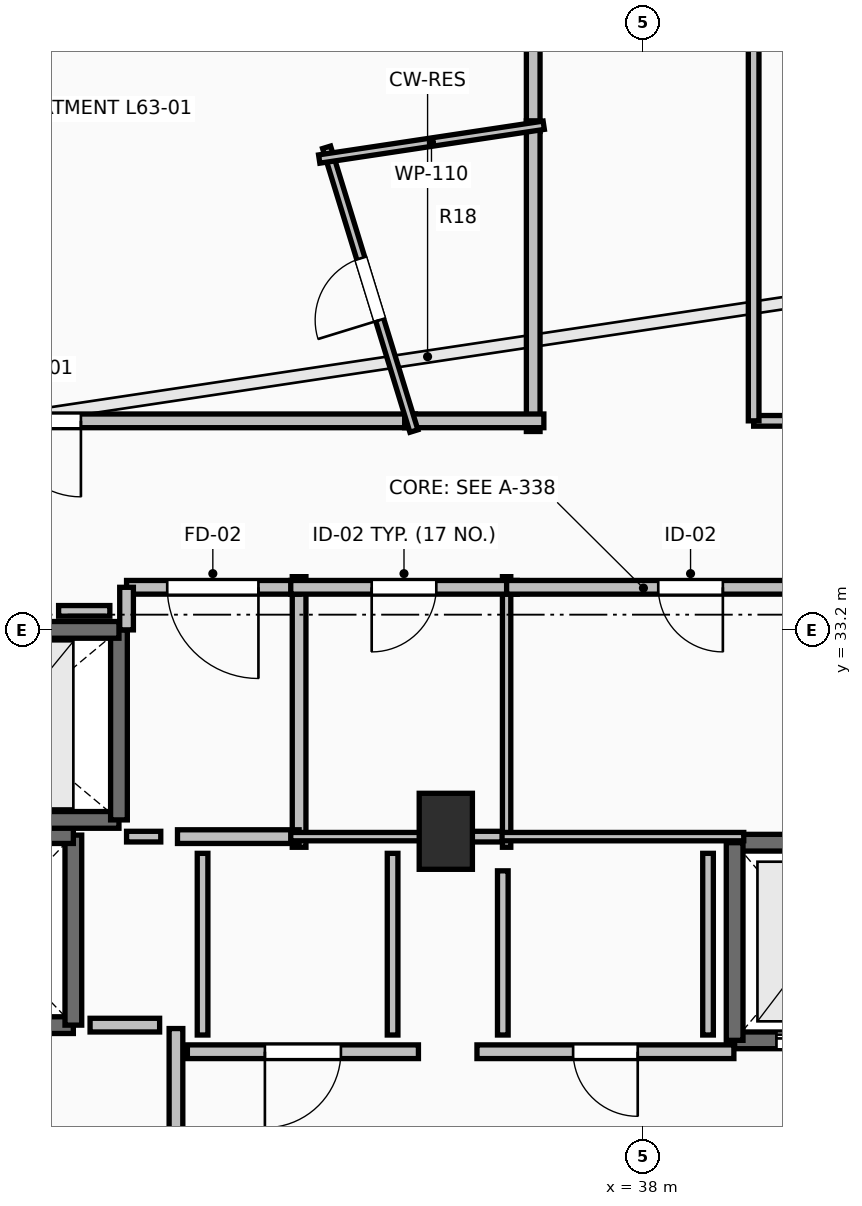
"""IFC4 building model, lengths in metres.
Left out: names, types, materials, properties, quantities, classifications, styles, units other than length and angle.
Written with IfcOpenShell. Run it as: python <this file> out.ifc"""

import sys

from ifc_helpers import new_model, si_unit, direction, frame, frame_2d, origin, origin_2d, place, context, subcontext, project, spatial, rectangle, extrude, element, fill, save


model = new_model("IFC4")
c1 = context("Model", 3, precision=1e-05, world=origin(), true_north=direction((0.0, 1.0)))
c2 = subcontext(c1, "Body", "Model", "MODEL_VIEW")
j1 = project(units=[si_unit("LENGTHUNIT", "METRE"), si_unit("PLANEANGLEUNIT", "RADIAN")], contexts=[c1])
p1 = place(None, origin())
s1 = spatial("IfcSite", under=j1, at=p1, CompositionType="ELEMENT")
p2 = place(p1, origin())
s2 = spatial("IfcBuilding", under=s1, at=p2, CompositionType="ELEMENT")
p3 = place(p2, frame((0.0, 0.0, 234.25)))
s3 = spatial("IfcBuildingStorey", under=s2, at=p3, CompositionType="ELEMENT", Elevation=234.25)
p4 = place(p3, frame((35.4, 30.55, 0.0), z_axis=(0.0, 0.0, 1.0), x_axis=(1.0, 0.0, 0.0)))
e1 = element("IfcColumn", 1, at=p4, inside=s3, PredefinedType="PILASTER", context=c2, shape_type="SweptSolid", body=[
    extrude(rectangle(XDim=0.7, YDim=1.0, at=origin_2d()), origin(), (0.0, 0.0, 1.0), 3.55),
])
p5 = place(p3, frame((39.2, 27.8, 0.0), z_axis=(0.0, 0.0, 1.0), x_axis=(1.0, 0.0, 0.0)))
e2 = element("IfcWall", 2, at=p5, inside=s3, PredefinedType="SOLIDWALL", context=c2, shape_type="SweptSolid", body=[
    extrude(rectangle(XDim=2.2, YDim=0.22, at=frame_2d((1.1, 0.0))), origin(), (0.0, 0.0, 1.0), 3.29),
])
p6 = place(p5, frame((0.55, 0.0, 0.0)))
e3 = element("IfcOpeningElement", 3, at=p6, cuts=e2, PredefinedType="OPENING", context=c2, shape_type="SweptSolid", body=[
    extrude(rectangle(XDim=1.1, YDim=2.2, at=frame_2d((0.55, 1.1))), frame((0.0, 0.125, 0.0), z_axis=(0.0, -1.0, 0.0), x_axis=(1.0, 0.0, 0.0)), (0.0, 0.0, 1.0), 0.25),
])
p7 = place(p3, frame((41.4, 30.4, 0.0), z_axis=(0.0, 0.0, 1.0), x_axis=(-1.0, 0.0, 0.0)))
e4 = element("IfcWall", 4, at=p7, inside=s3, PredefinedType="SOLIDWALL", context=c2, shape_type="SweptSolid", body=[
    extrude(rectangle(XDim=2.2, YDim=0.22, at=frame_2d((1.1, 0.0))), origin(), (0.0, 0.0, 1.0), 3.29),
])
p8 = place(p3, frame((39.2, 30.4, 0.0), z_axis=(0.0, 0.0, 1.0), x_axis=(0.0, -1.0, 0.0)))
e5 = element("IfcWall", 5, at=p8, inside=s3, PredefinedType="SOLIDWALL", context=c2, shape_type="SweptSolid", body=[
    extrude(rectangle(XDim=2.6, YDim=0.22, at=frame_2d((1.3, 0.0))), origin(), (0.0, 0.0, 1.0), 3.29),
])
p9 = place(p3, frame((28.1, 28.0, 0.0), z_axis=(0.0, 0.0, 1.0), x_axis=(1.0, 0.0, 0.0)))
e6 = element("IfcWall", 6, at=p9, inside=s3, PredefinedType="SHEAR", context=c2, shape_type="SweptSolid", body=[
    extrude(rectangle(XDim=2.4, YDim=0.22, at=frame_2d((1.2, 0.0))), origin(), (0.0, 0.0, 1.0), 3.29),
])
p10 = place(p9, frame((0.6, 0.0, 0.0)))
e7 = element("IfcOpeningElement", 7, at=p10, cuts=e6, PredefinedType="OPENING", context=c2, shape_type="SweptSolid", body=[
    extrude(rectangle(XDim=1.2, YDim=2.2, at=frame_2d((0.6, 1.1))), frame((0.0, 0.125, 0.0), z_axis=(0.0, -1.0, 0.0), x_axis=(1.0, 0.0, 0.0)), (0.0, 0.0, 1.0), 0.25),
])
p11 = place(p3, frame((30.5, 28.0, 0.0), z_axis=(0.0, 0.0, 1.0), x_axis=(0.0, 1.0, 0.0)))
e8 = element("IfcWall", 8, at=p11, inside=s3, PredefinedType="SHEAR", context=c2, shape_type="SweptSolid", body=[
    extrude(rectangle(XDim=2.5, YDim=0.22, at=frame_2d((1.25, 0.0))), origin(), (0.0, 0.0, 1.0), 3.29),
])
p12 = place(p3, frame((30.5, 30.5, 0.0), z_axis=(0.0, 0.0, 1.0), x_axis=(-1.0, 0.0, 0.0)))
e9 = element("IfcWall", 9, at=p12, inside=s3, PredefinedType="SHEAR", context=c2, shape_type="SweptSolid", body=[
    extrude(rectangle(XDim=2.4, YDim=0.22, at=frame_2d((1.2, 0.0))), origin(), (0.0, 0.0, 1.0), 3.29),
])
p13 = place(p3, frame((28.1, 30.7, 0.0), z_axis=(0.0, 0.0, 1.0), x_axis=(1.0, 0.0, 0.0)))
e10 = element("IfcWall", 10, at=p13, inside=s3, PredefinedType="SOLIDWALL", context=c2, shape_type="SweptSolid", body=[
    extrude(rectangle(XDim=3.0, YDim=0.22, at=frame_2d((1.5, 0.0))), origin(), (0.0, 0.0, 1.0), 3.29),
])
p14 = place(p3, frame((31.1, 30.7, 0.0), z_axis=(0.0, 0.0, 1.0), x_axis=(0.0, 1.0, 0.0)))
e11 = element("IfcWall", 11, at=p14, inside=s3, PredefinedType="SOLIDWALL", context=c2, shape_type="SweptSolid", body=[
    extrude(rectangle(XDim=2.5, YDim=0.22, at=frame_2d((1.25, 0.0))), origin(), (0.0, 0.0, 1.0), 3.29),
])
p15 = place(p3, frame((31.1, 33.2, 0.0), z_axis=(0.0, 0.0, 1.0), x_axis=(-1.0, 0.0, 0.0)))
e12 = element("IfcWall", 12, at=p15, inside=s3, PredefinedType="SOLIDWALL", context=c2, shape_type="SweptSolid", body=[
    extrude(rectangle(XDim=3.0, YDim=0.22, at=frame_2d((1.5, 0.0))), origin(), (0.0, 0.0, 1.0), 3.29),
])
p16 = place(p15, frame((0.9, 0.0, 0.0)))
e13 = element("IfcOpeningElement", 13, at=p16, cuts=e12, PredefinedType="OPENING", context=c2, shape_type="SweptSolid", body=[
    extrude(rectangle(XDim=1.2, YDim=2.2, at=frame_2d((0.6, 1.1))), frame((0.0, 0.125, 0.0), z_axis=(0.0, -1.0, 0.0), x_axis=(1.0, 0.0, 0.0)), (0.0, 0.0, 1.0), 0.25),
])
p17 = place(p3, frame((31.85, 24.045, 0.0), z_axis=(0.0, 0.0, 1.0), x_axis=(0.0, 1.0, 0.0)))
e14 = element("IfcWall", 14, at=p17, inside=s3, PredefinedType="PARTITIONING", context=c2, shape_type="SweptSolid", body=[
    extrude(rectangle(XDim=3.91, YDim=0.18, at=frame_2d((1.955, 0.0))), origin(), (0.0, 0.0, 1.0), 3.29),
])
p18 = place(p17, frame((1.355, 0.0, 0.0)))
e15 = element("IfcOpeningElement", 15, at=p18, cuts=e14, PredefinedType="OPENING", context=c2, shape_type="SweptSolid", body=[
    extrude(rectangle(XDim=1.2, YDim=2.15, at=frame_2d((0.6, 1.075))), frame((0.0, 0.105, 0.0), z_axis=(0.0, -1.0, 0.0), x_axis=(1.0, 0.0, 0.0)), (0.0, 0.0, 1.0), 0.21),
])
p19 = place(p3, frame((33.47, 30.34, 0.0), z_axis=(0.0, 0.0, 1.0), x_axis=(0.0, 1.0, 0.0)))
e16 = element("IfcWall", 16, at=p19, inside=s3, PredefinedType="PARTITIONING", context=c2, shape_type="SweptSolid", body=[
    extrude(rectangle(XDim=3.56, YDim=0.18, at=frame_2d((1.78, 0.0))), origin(), (0.0, 0.0, 1.0), 3.29),
])
p20 = place(p3, frame((31.87, 30.48, 0.0), z_axis=(0.0, 0.0, 1.0), x_axis=(1.0, 0.0, 0.0)))
e17 = element("IfcWall", 17, at=p20, inside=s3, PredefinedType="PARTITIONING", context=c2, shape_type="SweptSolid", body=[
    extrude(rectangle(XDim=1.6, YDim=0.18, at=frame_2d((0.8, 0.0))), origin(), (0.0, 0.0, 1.0), 3.29),
])
p21 = place(p3, frame((33.47, 33.76, 0.0), z_axis=(0.0, 0.0, 1.0), x_axis=(-1.0, 0.0, 0.0)))
e18 = element("IfcWall", 18, at=p21, inside=s3, PredefinedType="PARTITIONING", context=c2, shape_type="SweptSolid", body=[
    extrude(rectangle(XDim=2.27, YDim=0.18, at=frame_2d((1.135, 0.0))), origin(), (0.0, 0.0, 1.0), 3.29),
])
p22 = place(p21, frame((0.535, 0.0, 0.0)))
e19 = element("IfcOpeningElement", 19, at=p22, cuts=e18, PredefinedType="OPENING", context=c2, shape_type="SweptSolid", body=[
    extrude(rectangle(XDim=1.2, YDim=2.15, at=frame_2d((0.6, 1.075))), frame((0.0, 0.105, 0.0), z_axis=(0.0, -1.0, 0.0), x_axis=(1.0, 0.0, 0.0)), (0.0, 0.0, 1.0), 0.21),
])
p23 = place(p3, frame((31.2, 33.76, 0.0), z_axis=(0.0, 0.0, 1.0), x_axis=(0.0, -1.0, 0.0)))
e20 = element("IfcWall", 20, at=p23, inside=s3, PredefinedType="PARTITIONING", context=c2, shape_type="SweptSolid", body=[
    extrude(rectangle(XDim=0.56, YDim=0.18, at=frame_2d((0.28, 0.0))), origin(), (0.0, 0.0, 1.0), 3.29),
])
p24 = place(p3, frame((35.04, 27.65, 0.0), z_axis=(0.0, 0.0, 1.0), x_axis=(-1.0, 0.0, 0.0)))
e21 = element("IfcWall", 21, at=p24, inside=s3, PredefinedType="PARTITIONING", context=c2, shape_type="SweptSolid", body=[
    extrude(rectangle(XDim=3.04, YDim=0.18, at=frame_2d((1.52, 0.0))), origin(), (0.0, 0.0, 1.0), 3.29),
])
p25 = place(p24, frame((1.02, 0.0, 0.0)))
e22 = element("IfcOpeningElement", 22, at=p25, cuts=e21, PredefinedType="OPENING", context=c2, shape_type="SweptSolid", body=[
    extrude(rectangle(XDim=1.0, YDim=2.15, at=frame_2d((0.5, 1.075))), frame((0.0, 0.105, 0.0), z_axis=(0.0, -1.0, 0.0), x_axis=(1.0, 0.0, 0.0)), (0.0, 0.0, 1.0), 0.21),
])
p26 = place(p3, frame((39.19, 27.65, 0.0), z_axis=(0.0, 0.0, 1.0), x_axis=(-1.0, 0.0, 0.0)))
e23 = element("IfcWall", 23, at=p26, inside=s3, PredefinedType="PARTITIONING", context=c2, shape_type="SweptSolid", body=[
    extrude(rectangle(XDim=3.38, YDim=0.18, at=frame_2d((1.69, 0.0))), origin(), (0.0, 0.0, 1.0), 3.29),
])
p27 = place(p26, frame((1.265, 0.0, 0.0)))
e24 = element("IfcOpeningElement", 24, at=p27, cuts=e23, PredefinedType="OPENING", context=c2, shape_type="SweptSolid", body=[
    extrude(rectangle(XDim=0.85, YDim=2.1, at=frame_2d((0.425, 1.05))), frame((0.0, 0.105, 0.0), z_axis=(0.0, -1.0, 0.0), x_axis=(1.0, 0.0, 0.0)), (0.0, 0.0, 1.0), 0.21),
])
p28 = place(p3, frame((36.2, 30.34, 0.0), z_axis=(0.0, 0.0, 1.0), x_axis=(0.0, 1.0, 0.0)))
e25 = element("IfcWall", 25, at=p28, inside=s3, PredefinedType="PARTITIONING", context=c2, shape_type="SweptSolid", body=[
    extrude(rectangle(XDim=3.56, YDim=0.11, at=frame_2d((1.78, 0.0))), origin(), (0.0, 0.0, 1.0), 2.482),
])
p29 = place(p3, frame((33.36, 30.48, 0.0), z_axis=(0.0, 0.0, 1.0), x_axis=(1.0, 0.0, 0.0)))
e26 = element("IfcWall", 26, at=p29, inside=s3, PredefinedType="PARTITIONING", context=c2, shape_type="SweptSolid", body=[
    extrude(rectangle(XDim=1.81, YDim=0.11, at=frame_2d((0.905, 0.0))), origin(), (0.0, 0.0, 1.0), 3.29),
])
p30 = place(p3, frame((36.34, 33.76, 0.0), z_axis=(0.0, 0.0, 1.0), x_axis=(-1.0, 0.0, 0.0)))
e27 = element("IfcWall", 27, at=p30, inside=s3, PredefinedType="PARTITIONING", context=c2, shape_type="SweptSolid", body=[
    extrude(rectangle(XDim=2.98, YDim=0.18, at=frame_2d((1.49, 0.0))), origin(), (0.0, 0.0, 1.0), 3.29),
])
p31 = place(p30, frame((1.065, 0.0, 0.0)))
e28 = element("IfcOpeningElement", 28, at=p31, cuts=e27, PredefinedType="OPENING", context=c2, shape_type="SweptSolid", body=[
    extrude(rectangle(XDim=0.85, YDim=2.1, at=frame_2d((0.425, 1.05))), frame((0.0, 0.105, 0.0), z_axis=(0.0, -1.0, 0.0), x_axis=(1.0, 0.0, 0.0)), (0.0, 0.0, 1.0), 0.21),
])
p32 = place(p3, frame((36.11, 30.48, 0.0), z_axis=(0.0, 0.0, 1.0), x_axis=(1.0, 0.0, 0.0)))
e29 = element("IfcWall", 29, at=p32, inside=s3, PredefinedType="PARTITIONING", context=c2, shape_type="SweptSolid", body=[
    extrude(rectangle(XDim=3.21, YDim=0.11, at=frame_2d((1.605, 0.0))), origin(), (0.0, 0.0, 1.0), 2.482),
])
p33 = place(p3, frame((41.04, 33.76, 0.0), z_axis=(0.0, 0.0, 1.0), x_axis=(-1.0, 0.0, 0.0)))
e30 = element("IfcWall", 30, at=p33, inside=s3, PredefinedType="PARTITIONING", context=c2, shape_type="SweptSolid", body=[
    extrude(rectangle(XDim=4.84, YDim=0.18, at=frame_2d((2.42, 0.0))), origin(), (0.0, 0.0, 1.0), 3.29),
])
p34 = place(p33, frame((1.995, 0.0, 0.0)))
e31 = element("IfcOpeningElement", 31, at=p34, cuts=e30, PredefinedType="OPENING", context=c2, shape_type="SweptSolid", body=[
    extrude(rectangle(XDim=0.85, YDim=2.1, at=frame_2d((0.425, 1.05))), frame((0.0, 0.105, 0.0), z_axis=(0.0, -1.0, 0.0), x_axis=(1.0, 0.0, 0.0)), (0.0, 0.0, 1.0), 0.21),
])
p35 = place(p3, frame((36.55, 45.701, 0.0), z_axis=(0.0, 0.0, 1.0), x_axis=(0.0, -1.0, 0.0)))
e32 = element("IfcWall", 32, at=p35, inside=s3, PredefinedType="PARTITIONING", context=c2, shape_type="SweptSolid", body=[
    extrude(rectangle(XDim=5.944, YDim=0.18, at=frame_2d((2.972, 0.0))), origin(), (0.0, 0.0, 1.0), 2.482),
])
p36 = place(p3, frame((34.999, 35.95, 0.0), z_axis=(0.0, 0.0, 1.0), x_axis=(-1.0, 0.0, 0.0)))
e33 = element("IfcWall", 33, at=p36, inside=s3, PredefinedType="PARTITIONING", context=c2, shape_type="SweptSolid", body=[
    extrude(rectangle(XDim=9.799, YDim=0.18, at=frame_2d((4.899, 0.0))), origin(), (0.0, 0.0, 1.0), 2.482),
])
p37 = place(p36, frame((4.399, 0.0, 0.0)))
e34 = element("IfcOpeningElement", 34, at=p37, cuts=e33, PredefinedType="OPENING", context=c2, shape_type="SweptSolid", body=[
    extrude(rectangle(XDim=1.0, YDim=2.15, at=frame_2d((0.5, 1.075))), frame((0.0, 0.105, 0.0), z_axis=(0.0, -1.0, 0.0), x_axis=(1.0, 0.0, 0.0)), (0.0, 0.0, 1.0), 0.21),
])
p38 = place(p3, frame((36.55, 39.897, 0.0), z_axis=(0.0, 0.0, 1.0), x_axis=(0.0, -1.0, 0.0)))
e35 = element("IfcWall", 35, at=p38, inside=s3, PredefinedType="PARTITIONING", context=c2, shape_type="SweptSolid", body=[
    extrude(rectangle(XDim=4.087, YDim=0.18, at=frame_2d((2.043, 0.0))), origin(), (0.0, 0.0, 1.0), 2.924),
])
p39 = place(p3, frame((36.69, 35.95, 0.0), z_axis=(0.0, 0.0, 1.0), x_axis=(-1.0, 0.0, 0.0)))
e36 = element("IfcWall", 36, at=p39, inside=s3, PredefinedType="PARTITIONING", context=c2, shape_type="SweptSolid", body=[
    extrude(rectangle(XDim=1.831, YDim=0.18, at=frame_2d((0.916, 0.0))), origin(), (0.0, 0.0, 1.0), 3.29),
])
p40 = place(p3, frame((34.98, 35.816, 0.0), z_axis=(0.0, 0.0, 1.0), x_axis=(-0.29406827714, 0.955784415221, 0.0)))
e37 = element("IfcWall", 37, at=p40, inside=s3, PredefinedType="PARTITIONING", context=c2, shape_type="SweptSolid", body=[
    extrude(rectangle(XDim=3.905, YDim=0.11, at=frame_2d((1.953, 0.0))), origin(), (0.0, 0.0, 1.0), 2.482),
])
p41 = place(p40, frame((1.528, 0.0, 0.0)))
e38 = element("IfcOpeningElement", 38, at=p41, cuts=e37, PredefinedType="OPENING", context=c2, shape_type="SweptSolid", body=[
    extrude(rectangle(XDim=0.85, YDim=2.1, at=frame_2d((0.425, 1.05))), frame((0.0, 0.07, 0.0), z_axis=(0.0, -1.0, 0.0), x_axis=(1.0, 0.0, 0.0)), (0.0, 0.0, 1.0), 0.14),
])
p42 = place(p3, frame((33.735, 39.394, 0.0), z_axis=(0.0, 0.0, 1.0), x_axis=(0.988862493006, 0.148832019156, 0.0)))
e39 = element("IfcWall", 39, at=p42, inside=s3, PredefinedType="PARTITIONING", context=c2, shape_type="SweptSolid", body=[
    extrude(rectangle(XDim=2.987, YDim=0.11, at=frame_2d((1.494, 0.0))), origin(), (0.0, 0.0, 1.0), 2.482),
])
p43 = place(p3, frame((31.635, 28.0, 0.0), z_axis=(0.0, 0.0, 1.0), x_axis=(-1.0, 0.0, 0.0)))
e40 = element("IfcWall", 40, at=p43, inside=s3, PredefinedType="PARTITIONING", context=c2, shape_type="SweptSolid", body=[
    extrude(rectangle(XDim=0.915, YDim=0.18, at=frame_2d((0.458, 0.0))), origin(), (0.0, 0.0, 1.0), 3.29),
])
p44 = place(p3, frame((31.2, 30.48, 0.0), z_axis=(0.0, 0.0, 1.0), x_axis=(1.0, 0.0, 0.0)))
e41 = element("IfcWall", 41, at=p44, inside=s3, PredefinedType="PARTITIONING", context=c2, shape_type="SweptSolid", body=[
    extrude(rectangle(XDim=0.45, YDim=0.14, at=frame_2d((0.225, 0.0))), origin(), (0.0, 0.0, 1.0), 3.29),
])
p45 = place(p3, frame((35.14, 30.48, 0.0), z_axis=(0.0, 0.0, 1.0), x_axis=(1.0, 0.0, 0.0)))
e42 = element("IfcWall", 42, at=p45, inside=s3, PredefinedType="PARTITIONING", context=c2, shape_type="SweptSolid", body=[
    extrude(rectangle(XDim=1.0, YDim=0.14, at=frame_2d((0.5, 0.0))), origin(), (0.0, 0.0, 1.0), 2.482),
])
for number, where, z_axis, x_axis in (
    (43, (32.2, 30.26, 0.0), (0.0, 0.0, 1.0), (0.0, -1.0, 0.0)),
    (44, (34.7, 27.87, 0.0), (0.0, 0.0, 1.0), (0.0, 1.0, 0.0)),
):
    element("IfcWall", number, at=place(p3, frame(where, z_axis=z_axis, x_axis=x_axis)), inside=s3, PredefinedType="PARTITIONING", context=c2, shape_type="SweptSolid", body=[
        extrude(rectangle(XDim=2.39, YDim=0.14, at=frame_2d((1.195, 0.0))), origin(), (0.0, 0.0, 1.0), 3.29),
    ])
p46 = place(p3, frame((36.15, 30.03, 0.0), z_axis=(0.0, 0.0, 1.0), x_axis=(0.0, -1.0, 0.0)))
e45 = element("IfcWall", 45, at=p46, inside=s3, PredefinedType="PARTITIONING", context=c2, shape_type="SweptSolid", body=[
    extrude(rectangle(XDim=2.16, YDim=0.14, at=frame_2d((1.08, 0.0))), origin(), (0.0, 0.0, 1.0), 3.29),
])
p47 = place(p3, frame((38.85, 27.87, 0.0), z_axis=(0.0, 0.0, 1.0), x_axis=(0.0, 1.0, 0.0)))
e46 = element("IfcWall", 46, at=p47, inside=s3, PredefinedType="PARTITIONING", context=c2, shape_type="SweptSolid", body=[
    extrude(rectangle(XDim=2.39, YDim=0.14, at=frame_2d((1.195, 0.0))), origin(), (0.0, 0.0, 1.0), 3.29),
])
p48 = place(p3, frame((41.841, 35.95, 0.0), z_axis=(0.0, 0.0, 1.0), x_axis=(-1.0, 0.0, 0.0)))
e47 = element("IfcWall", 47, at=p48, inside=s3, PredefinedType="PARTITIONING", context=c2, shape_type="SweptSolid", body=[
    extrude(rectangle(XDim=2.391, YDim=0.14, at=frame_2d((1.196, 0.0))), origin(), (0.0, 0.0, 1.0), 3.29),
])
p49 = place(p3, frame((39.45, 35.95, 0.0), z_axis=(0.0, 0.0, 1.0), x_axis=(0.0, 1.0, 0.0)))
e48 = element("IfcWall", 48, at=p49, inside=s3, PredefinedType="PARTITIONING", context=c2, shape_type="SweptSolid", body=[
    extrude(rectangle(XDim=9.751, YDim=0.14, at=frame_2d((4.875, 0.0))), origin(), (0.0, 0.0, 1.0), 2.874),
])
p50 = place(p3, frame((30.98, 33.45, 0.0), z_axis=(0.0, 0.0, 1.0), x_axis=(-1.0, 0.0, 0.0)))
e49 = element("IfcWall", 49, at=p50, inside=s3, PredefinedType="PARTITIONING", context=c2, shape_type="SweptSolid", body=[
    extrude(rectangle(XDim=0.674, YDim=0.14, at=frame_2d((0.337, 0.0))), origin(), (0.0, 0.0, 1.0), 3.29),
])
p51 = place(p6, origin())
e50 = element("IfcDoor", 50, at=p51, inside=s3, OperationType="SLIDING_TO_LEFT", PredefinedType="DOOR", context=c2, shape_type="SweptSolid", body=[
    extrude(rectangle(XDim=1.1, YDim=2.2, at=frame_2d((0.55, 1.1))), frame((0.0, 0.025, 0.0), z_axis=(0.0, -1.0, 0.0), x_axis=(1.0, 0.0, 0.0)), (0.0, 0.0, 1.0), 0.05),
])
fill(e3, e50)
p52 = place(p22, origin())
e51 = element("IfcDoor", 51, at=p52, inside=s3, OperationType="SINGLE_SWING_LEFT", PredefinedType="DOOR", context=c2, shape_type="SweptSolid", body=[
    extrude(rectangle(XDim=1.2, YDim=2.15, at=frame_2d((0.6, 1.075))), frame((0.0, 0.025, 0.0), z_axis=(0.0, -1.0, 0.0), x_axis=(1.0, 0.0, 0.0)), (0.0, 0.0, 1.0), 0.05),
])
fill(e19, e51)
p53 = place(p25, origin())
e52 = element("IfcDoor", 52, at=p53, inside=s3, OperationType="SINGLE_SWING_RIGHT", PredefinedType="DOOR", context=c2, shape_type="SweptSolid", body=[
    extrude(rectangle(XDim=1.0, YDim=2.15, at=frame_2d((0.5, 1.075))), frame((0.0, 0.025, 0.0), z_axis=(0.0, -1.0, 0.0), x_axis=(1.0, 0.0, 0.0)), (0.0, 0.0, 1.0), 0.05),
])
fill(e22, e52)
p54 = place(p27, origin())
e53 = element("IfcDoor", 53, at=p54, inside=s3, OperationType="SINGLE_SWING_LEFT", PredefinedType="DOOR", context=c2, shape_type="SweptSolid", body=[
    extrude(rectangle(XDim=0.85, YDim=2.1, at=frame_2d((0.425, 1.05))), frame((0.0, 0.025, 0.0), z_axis=(0.0, -1.0, 0.0), x_axis=(1.0, 0.0, 0.0)), (0.0, 0.0, 1.0), 0.05),
])
fill(e24, e53)
p55 = place(p31, origin())
e54 = element("IfcDoor", 54, at=p55, inside=s3, OperationType="SINGLE_SWING_RIGHT", PredefinedType="DOOR", context=c2, shape_type="SweptSolid", body=[
    extrude(rectangle(XDim=0.85, YDim=2.1, at=frame_2d((0.425, 1.05))), frame((0.0, 0.025, 0.0), z_axis=(0.0, -1.0, 0.0), x_axis=(1.0, 0.0, 0.0)), (0.0, 0.0, 1.0), 0.05),
])
fill(e28, e54)
p56 = place(p34, origin())
e55 = element("IfcDoor", 55, at=p56, inside=s3, OperationType="SINGLE_SWING_LEFT", PredefinedType="DOOR", context=c2, shape_type="SweptSolid", body=[
    extrude(rectangle(XDim=0.85, YDim=2.1, at=frame_2d((0.425, 1.05))), frame((0.0, 0.025, 0.0), z_axis=(0.0, -1.0, 0.0), x_axis=(1.0, 0.0, 0.0)), (0.0, 0.0, 1.0), 0.05),
])
fill(e31, e55)
p57 = place(p37, origin())
e56 = element("IfcDoor", 56, at=p57, inside=s3, OperationType="SINGLE_SWING_LEFT", PredefinedType="DOOR", context=c2, shape_type="SweptSolid", body=[
    extrude(rectangle(XDim=1.0, YDim=2.15, at=frame_2d((0.5, 1.075))), frame((0.0, 0.025, 0.0), z_axis=(0.0, -1.0, 0.0), x_axis=(1.0, 0.0, 0.0)), (0.0, 0.0, 1.0), 0.05),
])
fill(e34, e56)
p58 = place(p41, origin())
e57 = element("IfcDoor", 57, at=p58, inside=s3, OperationType="SINGLE_SWING_LEFT", PredefinedType="DOOR", context=c2, shape_type="SweptSolid", body=[
    extrude(rectangle(XDim=0.85, YDim=2.1, at=frame_2d((0.425, 1.05))), frame((0.0, 0.025, 0.0), z_axis=(0.0, -1.0, 0.0), x_axis=(1.0, 0.0, 0.0)), (0.0, 0.0, 1.0), 0.05),
])
fill(e38, e57)
save(model, sys.argv[1])
